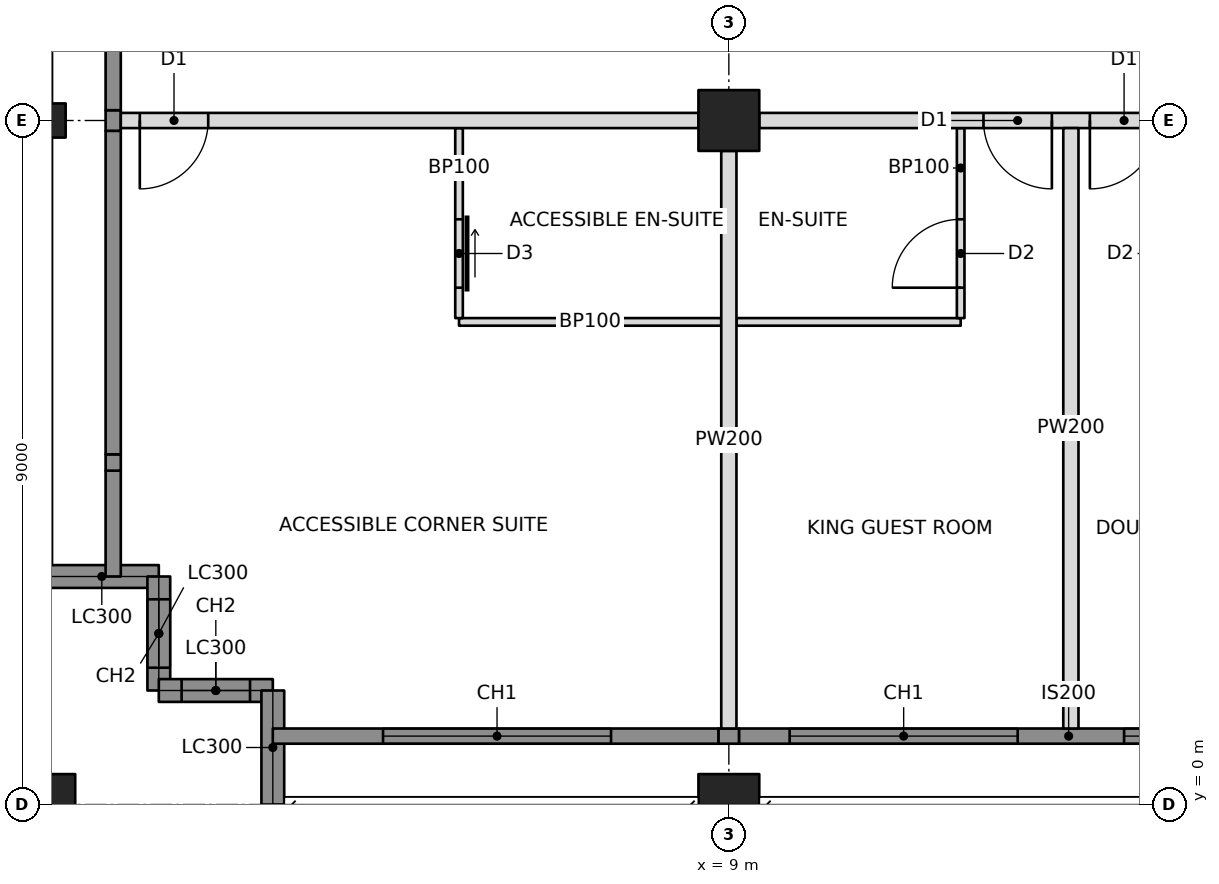
"""IFC4 building model, lengths in metres.
Left out: names, types, materials, properties, quantities, classifications, styles, units other than length and angle.
Written with IfcOpenShell. Run it as: python <this file> out.ifc"""

import sys

from ifc_helpers import new_model, si_unit, direction, frame, frame_2d, origin, origin_with_axes, origin_2d, place, context, subcontext, project, spatial, rectangle, hollow_rectangle, i_section, extrude, element, fill, save


model = new_model("IFC4")
c1 = context("Model", 3, precision=1e-05, world=origin(), true_north=direction((0.0, 1.0)))
c2 = subcontext(c1, "Body", "Model", "MODEL_VIEW")
j1 = project(units=[si_unit("LENGTHUNIT", "METRE"), si_unit("PLANEANGLEUNIT", "RADIAN")], contexts=[c1])
p1 = place(None, origin())
s1 = spatial("IfcSite", under=j1, at=p1, CompositionType="ELEMENT")
p2 = place(p1, origin())
s2 = spatial("IfcBuilding", under=s1, at=p2, CompositionType="ELEMENT")
p3 = place(p2, frame((0.0, 0.0, 184.2)))
s3 = spatial("IfcBuildingStorey", under=s2, at=p3, CompositionType="ELEMENT", Elevation=184.2)
p4 = place(p3, origin_with_axes())
e1 = element("IfcColumn", 1, at=p4, inside=s3, PredefinedType="COLUMN", context=c2, shape_type="SweptSolid", body=[
    extrude(hollow_rectangle(XDim=0.8, YDim=0.8, WallThickness=0.07, at=origin_2d()), origin(), (0.0, 0.0, 1.0), 3.4),
])
p5 = place(p3, frame((0.0, 9.0, 0.0), z_axis=(0.0, 0.0, 1.0), x_axis=(0.0, 1.0, 0.0)))
e2 = element("IfcColumn", 2, at=p5, inside=s3, PredefinedType="COLUMN", context=c2, shape_type="SweptSolid", body=[
    extrude(i_section(OverallWidth=0.449, OverallDepth=0.549, WebThickness=0.072, FlangeThickness=0.115, at=origin_2d()), origin(), (0.0, 0.0, 1.0), 3.4),
])
p6 = place(p3, frame((9.0, 0.0, 0.0), z_axis=(0.0, 0.0, 1.0), x_axis=(1.0, 0.0, 0.0)))
e3 = element("IfcColumn", 3, at=p6, inside=s3, PredefinedType="COLUMN", context=c2, shape_type="SweptSolid", body=[
    extrude(hollow_rectangle(XDim=0.8, YDim=0.8, WallThickness=0.07, at=origin_2d()), origin(), (0.0, 0.0, 1.0), 3.4),
])
p7 = place(p3, frame((9.0, 9.0, 0.0), z_axis=(0.0, 0.0, 1.0), x_axis=(1.0, 0.0, 0.0)))
e4 = element("IfcColumn", 4, at=p7, inside=s3, PredefinedType="COLUMN", context=c2, shape_type="SweptSolid", body=[
    extrude(hollow_rectangle(XDim=0.8, YDim=0.8, WallThickness=0.06, at=origin_2d()), origin(), (0.0, 0.0, 1.0), 3.4),
])
p8 = place(p3, frame((0.0, 3.0, 0.0), z_axis=(0.0, 0.0, 1.0), x_axis=(1.0, 0.0, 0.0)))
e5 = element("IfcWall", 5, at=p8, inside=s3, PredefinedType="SOLIDWALL", context=c2, shape_type="SweptSolid", body=[
    extrude(rectangle(XDim=1.5, YDim=0.3, at=frame_2d((0.75, 0.0))), origin(), (0.0, 0.0, 1.0), 2.42),
])
p9 = place(p3, frame((1.5, 3.0, 0.0), z_axis=(0.0, 0.0, 1.0), x_axis=(0.0, -1.0, 0.0)))
e6 = element("IfcWall", 6, at=p9, inside=s3, PredefinedType="SOLIDWALL", context=c2, shape_type="SweptSolid", body=[
    extrude(rectangle(XDim=1.5, YDim=0.3, at=frame_2d((0.75, 0.0))), origin(), (0.0, 0.0, 1.0), 3.2),
])
p10 = place(p9, frame((0.3, 0.0, 0.6)))
e7 = element("IfcOpeningElement", 7, at=p10, cuts=e6, PredefinedType="OPENING", context=c2, shape_type="SweptSolid", body=[
    extrude(rectangle(XDim=0.9, YDim=2.2, at=frame_2d((0.45, 1.1))), frame((0.0, 0.16, 0.0), z_axis=(0.0, -1.0, 0.0), x_axis=(1.0, 0.0, 0.0)), (0.0, 0.0, 1.0), 0.32),
])
p11 = place(p3, frame((1.5, 1.5, 0.0), z_axis=(0.0, 0.0, 1.0), x_axis=(1.0, 0.0, 0.0)))
e8 = element("IfcWall", 8, at=p11, inside=s3, PredefinedType="SOLIDWALL", context=c2, shape_type="SweptSolid", body=[
    extrude(rectangle(XDim=1.5, YDim=0.3, at=frame_2d((0.75, 0.0))), origin(), (0.0, 0.0, 1.0), 3.2),
])
p12 = place(p11, frame((0.3, 0.0, 0.6)))
e9 = element("IfcOpeningElement", 9, at=p12, cuts=e8, PredefinedType="OPENING", context=c2, shape_type="SweptSolid", body=[
    extrude(rectangle(XDim=0.9, YDim=2.2, at=frame_2d((0.45, 1.1))), frame((0.0, 0.16, 0.0), z_axis=(0.0, -1.0, 0.0), x_axis=(1.0, 0.0, 0.0)), (0.0, 0.0, 1.0), 0.32),
])
p13 = place(p3, frame((3.0, 1.5, 0.0), z_axis=(0.0, 0.0, 1.0), x_axis=(0.0, -1.0, 0.0)))
e10 = element("IfcWall", 10, at=p13, inside=s3, PredefinedType="SOLIDWALL", context=c2, shape_type="SweptSolid", body=[
    extrude(rectangle(XDim=1.5, YDim=0.3, at=frame_2d((0.75, 0.0))), origin(), (0.0, 0.0, 1.0), 2.42),
])
p14 = place(p3, frame((3.0, 0.9, 0.0), z_axis=(0.0, 0.0, 1.0), x_axis=(1.0, 0.0, 0.0)))
e11 = element("IfcWall", 11, at=p14, inside=s3, PredefinedType="SOLIDWALL", context=c2, shape_type="SweptSolid", body=[
    extrude(rectangle(XDim=5.865, YDim=0.2, at=frame_2d((2.932, 0.0))), origin(), (0.0, 0.0, 1.0), 3.2),
])
p15 = place(p14, frame((1.45, 0.0, 0.6)))
e12 = element("IfcOpeningElement", 12, at=p15, cuts=e11, PredefinedType="OPENING", context=c2, shape_type="SweptSolid", body=[
    extrude(rectangle(XDim=3.0, YDim=2.2, at=frame_2d((1.5, 1.1))), frame((0.0, 0.11, 0.0), z_axis=(0.0, -1.0, 0.0), x_axis=(1.0, 0.0, 0.0)), (0.0, 0.0, 1.0), 0.22),
])
p16 = place(p3, frame((0.9, 3.0, 0.0), z_axis=(0.0, 0.0, 1.0), x_axis=(0.0, 1.0, 0.0)))
e13 = element("IfcWall", 13, at=p16, inside=s3, PredefinedType="SOLIDWALL", context=c2, shape_type="SweptSolid", body=[
    extrude(rectangle(XDim=1.393, YDim=0.2, at=frame_2d((0.696, 0.0))), origin(), (0.0, 0.0, 1.0), 3.2),
])
p17 = place(p3, frame((1.0, 9.0, 0.0), z_axis=(0.0, 0.0, 1.0), x_axis=(1.0, 0.0, 0.0)))
e14 = element("IfcWall", 14, at=p17, inside=s3, PredefinedType="PARTITIONING", context=c2, shape_type="SweptSolid", body=[
    extrude(rectangle(XDim=7.6, YDim=0.2, at=frame_2d((3.8, 0.0))), origin(), (0.0, 0.0, 1.0), 2.438),
])
p18 = place(p17, frame((0.25, 0.0, 0.0)))
e15 = element("IfcOpeningElement", 15, at=p18, cuts=e14, PredefinedType="OPENING", context=c2, shape_type="SweptSolid", body=[
    extrude(rectangle(XDim=0.9, YDim=2.1, at=frame_2d((0.45, 1.05))), frame((0.0, 0.11, 0.0), z_axis=(0.0, -1.0, 0.0), x_axis=(1.0, 0.0, 0.0)), (0.0, 0.0, 1.0), 0.22),
])
p19 = place(p3, frame((9.4, 9.0, 0.0), z_axis=(0.0, 0.0, 1.0), x_axis=(1.0, 0.0, 0.0)))
e16 = element("IfcWall", 16, at=p19, inside=s3, PredefinedType="PARTITIONING", context=c2, shape_type="SweptSolid", body=[
    extrude(rectangle(XDim=8.2, YDim=0.2, at=frame_2d((4.1, 0.0))), origin(), (0.0, 0.0, 1.0), 2.405),
])
p20 = place(p19, frame((2.95, 0.0, 0.0)))
e17 = element("IfcOpeningElement", 17, at=p20, cuts=e16, PredefinedType="OPENING", context=c2, shape_type="SweptSolid", body=[
    extrude(rectangle(XDim=0.9, YDim=2.1, at=frame_2d((0.45, 1.05))), frame((0.0, 0.11, 0.0), z_axis=(0.0, -1.0, 0.0), x_axis=(1.0, 0.0, 0.0)), (0.0, 0.0, 1.0), 0.22),
])
p21 = place(p19, frame((4.35, 0.0, 0.0)))
e18 = element("IfcOpeningElement", 18, at=p21, cuts=e16, PredefinedType="OPENING", context=c2, shape_type="SweptSolid", body=[
    extrude(rectangle(XDim=0.9, YDim=2.1, at=frame_2d((0.45, 1.05))), frame((0.0, 0.11, 0.0), z_axis=(0.0, -1.0, 0.0), x_axis=(1.0, 0.0, 0.0)), (0.0, 0.0, 1.0), 0.22),
])
p22 = place(p3, frame((9.0, 8.6, 0.0), z_axis=(0.0, 0.0, 1.0), x_axis=(0.0, -1.0, 0.0)))
e19 = element("IfcWall", 19, at=p22, inside=s3, PredefinedType="PARTITIONING", context=c2, shape_type="SweptSolid", body=[
    extrude(rectangle(XDim=7.6, YDim=0.2, at=frame_2d((3.8, 0.0))), origin(), (0.0, 0.0, 1.0), 2.438),
])
p23 = place(p3, frame((13.5, 8.9, 0.0), z_axis=(0.0, 0.0, 1.0), x_axis=(0.0, -1.0, 0.0)))
e20 = element("IfcWall", 20, at=p23, inside=s3, PredefinedType="PARTITIONING", context=c2, shape_type="SweptSolid", body=[
    extrude(rectangle(XDim=7.9, YDim=0.2, at=frame_2d((3.95, 0.0))), origin(), (0.0, 0.0, 1.0), 2.404),
])
p24 = place(p3, frame((5.45, 6.35, 0.0), z_axis=(0.0, 0.0, 1.0), x_axis=(1.0, 0.0, 0.0)))
e21 = element("IfcWall", 21, at=p24, inside=s3, PredefinedType="PARTITIONING", context=c2, shape_type="SweptSolid", body=[
    extrude(rectangle(XDim=3.45, YDim=0.1, at=frame_2d((1.725, 0.0))), origin(), (0.0, 0.0, 1.0), 2.438),
])
p25 = place(p3, frame((5.45, 8.9, 0.0), z_axis=(0.0, 0.0, 1.0), x_axis=(0.0, -1.0, 0.0)))
e22 = element("IfcWall", 22, at=p25, inside=s3, PredefinedType="PARTITIONING", context=c2, shape_type="SweptSolid", body=[
    extrude(rectangle(XDim=2.5, YDim=0.1, at=frame_2d((1.25, 0.0))), origin(), (0.0, 0.0, 1.0), 2.438),
])
p26 = place(p25, frame((1.2, 0.0, 0.0)))
e23 = element("IfcOpeningElement", 23, at=p26, cuts=e22, PredefinedType="OPENING", context=c2, shape_type="SweptSolid", body=[
    extrude(rectangle(XDim=0.9, YDim=2.1, at=frame_2d((0.45, 1.05))), frame((0.0, 0.06, 0.0), z_axis=(0.0, -1.0, 0.0), x_axis=(1.0, 0.0, 0.0)), (0.0, 0.0, 1.0), 0.12),
])
p27 = place(p3, frame((9.1, 6.35, 0.0), z_axis=(0.0, 0.0, 1.0), x_axis=(1.0, 0.0, 0.0)))
e24 = element("IfcWall", 24, at=p27, inside=s3, PredefinedType="PARTITIONING", context=c2, shape_type="SweptSolid", body=[
    extrude(rectangle(XDim=2.95, YDim=0.1, at=frame_2d((1.475, 0.0))), origin(), (0.0, 0.0, 1.0), 2.438),
])
p28 = place(p3, frame((12.05, 8.9, 0.0), z_axis=(0.0, 0.0, 1.0), x_axis=(0.0, -1.0, 0.0)))
e25 = element("IfcWall", 25, at=p28, inside=s3, PredefinedType="PARTITIONING", context=c2, shape_type="SweptSolid", body=[
    extrude(rectangle(XDim=2.5, YDim=0.1, at=frame_2d((1.25, 0.0))), origin(), (0.0, 0.0, 1.0), 2.404),
])
p29 = place(p28, frame((1.2, 0.0, 0.0)))
e26 = element("IfcOpeningElement", 26, at=p29, cuts=e25, PredefinedType="OPENING", context=c2, shape_type="SweptSolid", body=[
    extrude(rectangle(XDim=0.9, YDim=2.1, at=frame_2d((0.45, 1.05))), frame((0.0, 0.06, 0.0), z_axis=(0.0, -1.0, 0.0), x_axis=(1.0, 0.0, 0.0)), (0.0, 0.0, 1.0), 0.12),
])
p30 = place(p3, frame((8.865, 0.9, 0.0), z_axis=(0.0, 0.0, 1.0), x_axis=(1.0, 0.0, 0.0)))
e27 = element("IfcWall", 27, at=p30, inside=s3, PredefinedType="SOLIDWALL", context=c2, shape_type="SweptSolid", body=[
    extrude(rectangle(XDim=0.271, YDim=0.2, at=frame_2d((0.135, 0.0))), origin(), (0.0, 0.0, 1.0), 2.438),
])
p31 = place(p3, frame((9.135, 0.9, 0.0), z_axis=(0.0, 0.0, 1.0), x_axis=(1.0, 0.0, 0.0)))
e28 = element("IfcWall", 28, at=p31, inside=s3, PredefinedType="SOLIDWALL", context=c2, shape_type="SweptSolid", body=[
    extrude(rectangle(XDim=8.671, YDim=0.2, at=frame_2d((4.335, 0.0))), origin(), (0.0, 0.0, 1.0), 3.2),
])
p32 = place(p31, frame((0.665, 0.0, 0.6)))
e29 = element("IfcOpeningElement", 29, at=p32, cuts=e28, PredefinedType="OPENING", context=c2, shape_type="SweptSolid", body=[
    extrude(rectangle(XDim=3.0, YDim=2.2, at=frame_2d((1.5, 1.1))), frame((0.0, 0.11, 0.0), z_axis=(0.0, -1.0, 0.0), x_axis=(1.0, 0.0, 0.0)), (0.0, 0.0, 1.0), 0.22),
])
p33 = place(p31, frame((5.065, 0.0, 0.6)))
e30 = element("IfcOpeningElement", 30, at=p33, cuts=e28, PredefinedType="OPENING", context=c2, shape_type="SweptSolid", body=[
    extrude(rectangle(XDim=3.0, YDim=2.2, at=frame_2d((1.5, 1.1))), frame((0.0, 0.11, 0.0), z_axis=(0.0, -1.0, 0.0), x_axis=(1.0, 0.0, 0.0)), (0.0, 0.0, 1.0), 0.22),
])
p34 = place(p3, frame((0.9, 4.393, 0.0), z_axis=(0.0, 0.0, 1.0), x_axis=(0.0, 1.0, 0.0)))
e31 = element("IfcWall", 31, at=p34, inside=s3, PredefinedType="SOLIDWALL", context=c2, shape_type="SweptSolid", body=[
    extrude(rectangle(XDim=0.215, YDim=0.2, at=frame_2d((0.107, 0.0))), origin(), (0.0, 0.0, 1.0), 2.661),
])
p35 = place(p3, frame((0.9, 4.607, 0.0), z_axis=(0.0, 0.0, 1.0), x_axis=(0.0, 1.0, 0.0)))
e32 = element("IfcWall", 32, at=p35, inside=s3, PredefinedType="SOLIDWALL", context=c2, shape_type="SweptSolid", body=[
    extrude(rectangle(XDim=4.257, YDim=0.2, at=frame_2d((2.129, 0.0))), origin(), (0.0, 0.0, 1.0), 3.2),
])
p36 = place(p3, frame((0.9, 8.865, 0.0), z_axis=(0.0, 0.0, 1.0), x_axis=(0.0, 1.0, 0.0)))
e33 = element("IfcWall", 33, at=p36, inside=s3, PredefinedType="SOLIDWALL", context=c2, shape_type="SweptSolid", body=[
    extrude(rectangle(XDim=0.271, YDim=0.2, at=frame_2d((0.135, 0.0))), origin(), (0.0, 0.0, 1.0), 2.438),
])
p37 = place(p3, frame((0.9, 9.135, 0.0), z_axis=(0.0, 0.0, 1.0), x_axis=(0.0, 1.0, 0.0)))
e34 = element("IfcWall", 34, at=p37, inside=s3, PredefinedType="SOLIDWALL", context=c2, shape_type="SweptSolid", body=[
    extrude(rectangle(XDim=8.671, YDim=0.2, at=frame_2d((4.335, 0.0))), origin(), (0.0, 0.0, 1.0), 3.2),
])
p38 = place(p37, frame((2.015, 0.0, 0.6)))
e35 = element("IfcOpeningElement", 35, at=p38, cuts=e34, PredefinedType="OPENING", context=c2, shape_type="SweptSolid", body=[
    extrude(rectangle(XDim=3.0, YDim=2.2, at=frame_2d((1.5, 1.1))), frame((0.0, 0.11, 0.0), z_axis=(0.0, -1.0, 0.0), x_axis=(1.0, 0.0, 0.0)), (0.0, 0.0, 1.0), 0.22),
])
p39 = place(p37, frame((5.515, 0.0, 0.6)))
e36 = element("IfcOpeningElement", 36, at=p39, cuts=e34, PredefinedType="OPENING", context=c2, shape_type="SweptSolid", body=[
    extrude(rectangle(XDim=3.0, YDim=2.2, at=frame_2d((1.5, 1.1))), frame((0.0, 0.11, 0.0), z_axis=(0.0, -1.0, 0.0), x_axis=(1.0, 0.0, 0.0)), (0.0, 0.0, 1.0), 0.22),
])
p40 = place(p10, origin())
e37 = element("IfcWindow", 37, at=p40, inside=s3, PartitioningType="SINGLE_PANEL", PredefinedType="WINDOW", context=c2, shape_type="SweptSolid", body=[
    extrude(rectangle(XDim=0.9, YDim=2.2, at=frame_2d((0.45, 1.1))), frame((0.0, 0.03, 0.0), z_axis=(0.0, -1.0, 0.0), x_axis=(1.0, 0.0, 0.0)), (0.0, 0.0, 1.0), 0.06),
])
fill(e7, e37)
p41 = place(p12, origin())
e38 = element("IfcWindow", 38, at=p41, inside=s3, PartitioningType="SINGLE_PANEL", PredefinedType="WINDOW", context=c2, shape_type="SweptSolid", body=[
    extrude(rectangle(XDim=0.9, YDim=2.2, at=frame_2d((0.45, 1.1))), frame((0.0, 0.03, 0.0), z_axis=(0.0, -1.0, 0.0), x_axis=(1.0, 0.0, 0.0)), (0.0, 0.0, 1.0), 0.06),
])
fill(e9, e38)
p42 = place(p15, origin())
e39 = element("IfcWindow", 39, at=p42, inside=s3, PartitioningType="TRIPLE_PANEL_VERTICAL", PredefinedType="WINDOW", context=c2, shape_type="SweptSolid", body=[
    extrude(rectangle(XDim=3.0, YDim=2.2, at=frame_2d((1.5, 1.1))), frame((0.0, 0.03, 0.0), z_axis=(0.0, -1.0, 0.0), x_axis=(1.0, 0.0, 0.0)), (0.0, 0.0, 1.0), 0.06),
])
fill(e12, e39)
p43 = place(p32, origin())
e40 = element("IfcWindow", 40, at=p43, inside=s3, PartitioningType="TRIPLE_PANEL_VERTICAL", PredefinedType="WINDOW", context=c2, shape_type="SweptSolid", body=[
    extrude(rectangle(XDim=3.0, YDim=2.2, at=frame_2d((1.5, 1.1))), frame((0.0, 0.03, 0.0), z_axis=(0.0, -1.0, 0.0), x_axis=(1.0, 0.0, 0.0)), (0.0, 0.0, 1.0), 0.06),
])
fill(e29, e40)
p44 = place(p33, origin())
e41 = element("IfcWindow", 41, at=p44, inside=s3, PartitioningType="TRIPLE_PANEL_VERTICAL", PredefinedType="WINDOW", context=c2, shape_type="SweptSolid", body=[
    extrude(rectangle(XDim=3.0, YDim=2.2, at=frame_2d((1.5, 1.1))), frame((0.0, 0.03, 0.0), z_axis=(0.0, -1.0, 0.0), x_axis=(1.0, 0.0, 0.0)), (0.0, 0.0, 1.0), 0.06),
])
fill(e30, e41)
p45 = place(p26, origin())
e42 = element("IfcDoor", 42, at=p45, inside=s3, OperationType="SLIDING_TO_LEFT", PredefinedType="DOOR", context=c2, shape_type="SweptSolid", body=[
    extrude(rectangle(XDim=0.9, YDim=2.1, at=frame_2d((0.45, 1.05))), frame((0.0, 0.025, 0.0), z_axis=(0.0, -1.0, 0.0), x_axis=(1.0, 0.0, 0.0)), (0.0, 0.0, 1.0), 0.05),
])
fill(e23, e42)
p46 = place(p18, frame((0.9, 0.0, 0.0), z_axis=(0.0, 0.0, 1.0), x_axis=(-1.0, 0.0, 0.0)))
e43 = element("IfcDoor", 43, at=p46, inside=s3, OperationType="SINGLE_SWING_RIGHT", PredefinedType="DOOR", context=c2, shape_type="SweptSolid", body=[
    extrude(rectangle(XDim=0.9, YDim=2.1, at=frame_2d((0.45, 1.05))), frame((0.0, 0.025, 0.0), z_axis=(0.0, -1.0, 0.0), x_axis=(1.0, 0.0, 0.0)), (0.0, 0.0, 1.0), 0.05),
])
fill(e15, e43)
p47 = place(p29, frame((0.9, 0.0, 0.0), z_axis=(0.0, 0.0, 1.0), x_axis=(-1.0, 0.0, 0.0)))
e44 = element("IfcDoor", 44, at=p47, inside=s3, OperationType="SINGLE_SWING_LEFT", PredefinedType="DOOR", context=c2, shape_type="SweptSolid", body=[
    extrude(rectangle(XDim=0.9, YDim=2.1, at=frame_2d((0.45, 1.05))), frame((0.0, 0.025, 0.0), z_axis=(0.0, -1.0, 0.0), x_axis=(1.0, 0.0, 0.0)), (0.0, 0.0, 1.0), 0.05),
])
fill(e26, e44)
p48 = place(p20, frame((0.9, 0.0, 0.0), z_axis=(0.0, 0.0, 1.0), x_axis=(-1.0, 0.0, 0.0)))
e45 = element("IfcDoor", 45, at=p48, inside=s3, OperationType="SINGLE_SWING_LEFT", PredefinedType="DOOR", context=c2, shape_type="SweptSolid", body=[
    extrude(rectangle(XDim=0.9, YDim=2.1, at=frame_2d((0.45, 1.05))), frame((0.0, 0.025, 0.0), z_axis=(0.0, -1.0, 0.0), x_axis=(1.0, 0.0, 0.0)), (0.0, 0.0, 1.0), 0.05),
])
fill(e17, e45)
p49 = place(p21, frame((0.9, 0.0, 0.0), z_axis=(0.0, 0.0, 1.0), x_axis=(-1.0, 0.0, 0.0)))
e46 = element("IfcDoor", 46, at=p49, inside=s3, OperationType="SINGLE_SWING_RIGHT", PredefinedType="DOOR", context=c2, shape_type="SweptSolid", body=[
    extrude(rectangle(XDim=0.9, YDim=2.1, at=frame_2d((0.45, 1.05))), frame((0.0, 0.025, 0.0), z_axis=(0.0, -1.0, 0.0), x_axis=(1.0, 0.0, 0.0)), (0.0, 0.0, 1.0), 0.05),
])
fill(e18, e46)
save(model, sys.argv[1])
